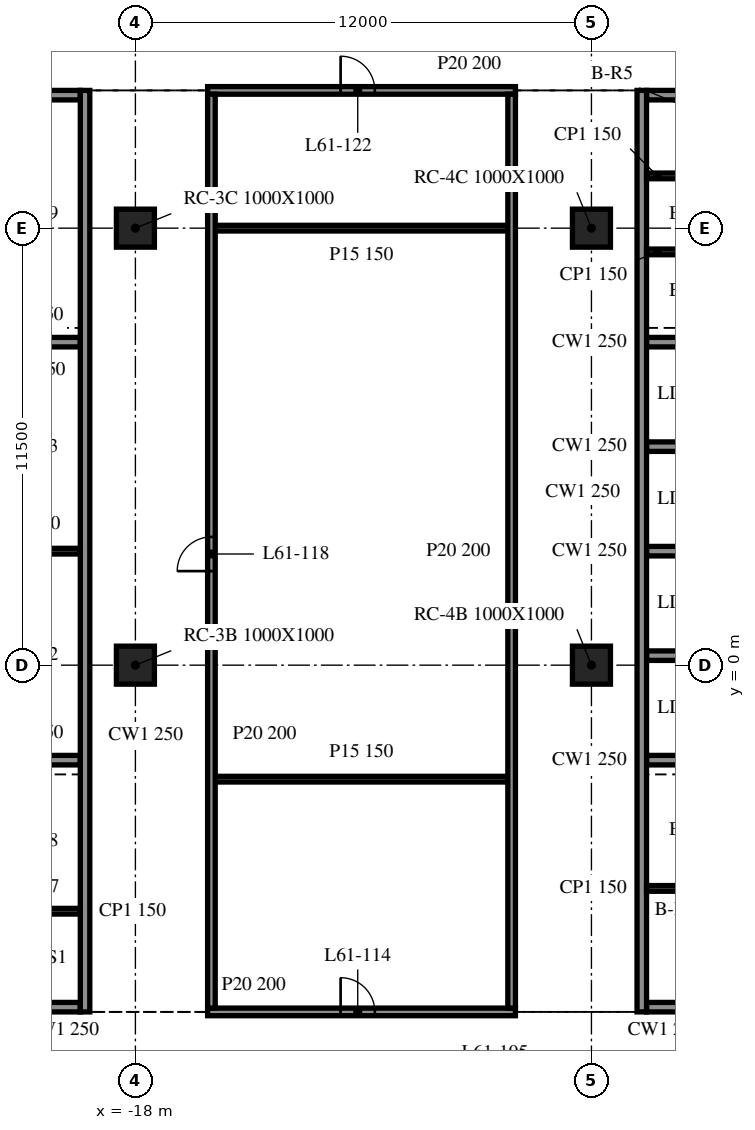
"""IFC4 building model, lengths in metres.
Left out: names, types, materials, properties, quantities, classifications, styles, units other than length and angle.
Written with IfcOpenShell. Run it as: python <this file> out.ifc"""

import sys

from ifc_helpers import new_model, si_unit, direction, frame, frame_2d, origin, origin_2d, place, context, subcontext, project, spatial, rectangle, extrude, element, fill, save


model = new_model("IFC4")
c1 = context("Model", 3, precision=1e-05, world=origin(), true_north=direction((0.0, 1.0)))
c2 = subcontext(c1, "Body", "Model", "MODEL_VIEW")
j1 = project(units=[si_unit("LENGTHUNIT", "METRE"), si_unit("PLANEANGLEUNIT", "RADIAN")], contexts=[c1])
p1 = place(None, origin())
s1 = spatial("IfcSite", under=j1, at=p1, CompositionType="ELEMENT")
p2 = place(p1, origin())
s2 = spatial("IfcBuilding", under=s1, at=p2, CompositionType="ELEMENT")
p3 = place(p2, frame((0.0, 0.0, 251.4)))
s3 = spatial("IfcBuildingStorey", under=s2, at=p3, CompositionType="ELEMENT", Elevation=251.4)
for number, where, z_axis, x_axis in (
    (1, (-18.0, 0.0, -0.34), (0.0, 0.0, 1.0), (1.0, 0.0, 0.0)),
    (2, (-18.0, 11.5, -0.34), (0.0, 0.0, 1.0), (1.0, 0.0, 0.0)),
    (3, (-6.0, 0.0, -0.34), (0.0, 0.0, 1.0), (1.0, 0.0, 0.0)),
    (4, (-6.0, 11.5, -0.34), (0.0, 0.0, 1.0), (1.0, 0.0, 0.0)),
):
    element("IfcColumn", number, at=place(p3, frame(where, z_axis=z_axis, x_axis=x_axis)), inside=s3, PredefinedType="COLUMN", context=c2, shape_type="SweptSolid", body=[
        extrude(rectangle(XDim=1.0, YDim=1.0, at=origin_2d()), origin(), (0.0, 0.0, 1.0), 3.8),
    ])
p4 = place(p3, frame((-19.325, -9.125, 0.0), z_axis=(0.0, 0.0, 1.0), x_axis=(0.0, 1.0, 0.0)))
e5 = element("IfcWall", 5, at=p4, inside=s3, PredefinedType="SOLIDWALL", context=c2, shape_type="SweptSolid", body=[
    extrude(rectangle(XDim=24.25, YDim=0.25, at=frame_2d((12.125, 0.0))), origin(), (0.0, 0.0, 1.0), 3.46),
])
p5 = place(p3, frame((-19.45, -9.0, 0.0), z_axis=(0.0, 0.0, 1.0), x_axis=(-1.0, 0.0, 0.0)))
e6 = element("IfcWall", 6, at=p5, inside=s3, PredefinedType="SOLIDWALL", context=c2, shape_type="SweptSolid", body=[
    extrude(rectangle(XDim=9.1, YDim=0.25, at=frame_2d((4.55, 0.0))), origin(), (0.0, 0.0, 1.0), 3.46),
])
p6 = place(p5, frame((3.65, 0.0, 0.0)))
e7 = element("IfcOpeningElement", 7, at=p6, cuts=e6, PredefinedType="OPENING", context=c2, shape_type="SweptSolid", body=[
    extrude(rectangle(XDim=1.8, YDim=2.1, at=frame_2d((0.9, 1.05))), frame((0.0, 0.135, 0.0), z_axis=(0.0, -1.0, 0.0), x_axis=(1.0, 0.0, 0.0)), (0.0, 0.0, 1.0), 0.27),
])
p7 = place(p3, frame((-28.55, 15.0, 0.0), z_axis=(0.0, 0.0, 1.0), x_axis=(1.0, 0.0, 0.0)))
e8 = element("IfcWall", 8, at=p7, inside=s3, PredefinedType="SOLIDWALL", context=c2, shape_type="SweptSolid", body=[
    extrude(rectangle(XDim=9.1, YDim=0.25, at=frame_2d((4.55, 0.0))), origin(), (0.0, 0.0, 1.0), 3.46),
])
p8 = place(p7, frame((3.65, 0.0, 0.0)))
e9 = element("IfcOpeningElement", 9, at=p8, cuts=e8, PredefinedType="OPENING", context=c2, shape_type="SweptSolid", body=[
    extrude(rectangle(XDim=1.8, YDim=2.1, at=frame_2d((0.9, 1.05))), frame((0.0, 0.135, 0.0), z_axis=(0.0, -1.0, 0.0), x_axis=(1.0, 0.0, 0.0)), (0.0, 0.0, 1.0), 0.27),
])
for number, where, z_axis, x_axis in (
    (10, (-22.3, -2.5, 0.0), (0.0, 0.0, 1.0), (1.0, 0.0, 0.0)),
    (11, (-22.3, 8.5, 0.0), (0.0, 0.0, 1.0), (1.0, 0.0, 0.0)),
):
    element("IfcWall", number, at=place(p3, frame(where, z_axis=z_axis, x_axis=x_axis)), inside=s3, PredefinedType="SOLIDWALL", context=c2, shape_type="SweptSolid", body=[
        extrude(rectangle(XDim=2.85, YDim=0.25, at=frame_2d((1.425, 0.0))), origin(), (0.0, 0.0, 1.0), 3.46),
    ])
for number, where, z_axis, x_axis in (
    (12, (-22.3, 3.0, 0.0), (0.0, 0.0, 1.0), (1.0, 0.0, 0.0)),
    (13, (-22.3, -6.475, 0.0), (0.0, 0.0, 1.0), (1.0, 0.0, 0.0)),
):
    element("IfcWall", number, at=place(p3, frame(where, z_axis=z_axis, x_axis=x_axis)), inside=s3, PredefinedType="PARTITIONING", context=c2, shape_type="SweptSolid", body=[
        extrude(rectangle(XDim=2.85, YDim=0.15, at=frame_2d((1.425, 0.0))), origin(), (0.0, 0.0, 1.0), 3.46),
    ])
p9 = place(p3, frame((-4.675, 15.125, 0.0), z_axis=(0.0, 0.0, 1.0), x_axis=(0.0, -1.0, 0.0)))
e14 = element("IfcWall", 14, at=p9, inside=s3, PredefinedType="SOLIDWALL", context=c2, shape_type="SweptSolid", body=[
    extrude(rectangle(XDim=24.25, YDim=0.25, at=frame_2d((12.125, 0.0))), origin(), (0.0, 0.0, 1.0), 3.46),
])
p10 = place(p3, frame((4.55, -9.0, 0.0), z_axis=(0.0, 0.0, 1.0), x_axis=(-1.0, 0.0, 0.0)))
e15 = element("IfcWall", 15, at=p10, inside=s3, PredefinedType="SOLIDWALL", context=c2, shape_type="SweptSolid", body=[
    extrude(rectangle(XDim=9.1, YDim=0.25, at=frame_2d((4.55, 0.0))), origin(), (0.0, 0.0, 1.0), 3.46),
])
p11 = place(p10, frame((3.65, 0.0, 0.0)))
e16 = element("IfcOpeningElement", 16, at=p11, cuts=e15, PredefinedType="OPENING", context=c2, shape_type="SweptSolid", body=[
    extrude(rectangle(XDim=1.8, YDim=2.1, at=frame_2d((0.9, 1.05))), frame((0.0, 0.135, 0.0), z_axis=(0.0, -1.0, 0.0), x_axis=(1.0, 0.0, 0.0)), (0.0, 0.0, 1.0), 0.27),
])
p12 = place(p3, frame((-4.55, 15.0, 0.0), z_axis=(0.0, 0.0, 1.0), x_axis=(1.0, 0.0, 0.0)))
e17 = element("IfcWall", 17, at=p12, inside=s3, PredefinedType="SOLIDWALL", context=c2, shape_type="SweptSolid", body=[
    extrude(rectangle(XDim=9.1, YDim=0.25, at=frame_2d((4.55, 0.0))), origin(), (0.0, 0.0, 1.0), 3.46),
])
p13 = place(p12, frame((3.65, 0.0, 0.0)))
e18 = element("IfcOpeningElement", 18, at=p13, cuts=e17, PredefinedType="OPENING", context=c2, shape_type="SweptSolid", body=[
    extrude(rectangle(XDim=1.8, YDim=2.1, at=frame_2d((0.9, 1.05))), frame((0.0, 0.135, 0.0), z_axis=(0.0, -1.0, 0.0), x_axis=(1.0, 0.0, 0.0)), (0.0, 0.0, 1.0), 0.27),
])
for number, where, z_axis, x_axis in (
    (19, (-4.55, -2.5, 0.0), (0.0, 0.0, 1.0), (1.0, 0.0, 0.0)),
    (20, (-4.55, 0.25, 0.0), (0.0, 0.0, 1.0), (1.0, 0.0, 0.0)),
    (21, (-4.55, 3.0, 0.0), (0.0, 0.0, 1.0), (1.0, 0.0, 0.0)),
    (22, (-4.55, 5.75, 0.0), (0.0, 0.0, 1.0), (1.0, 0.0, 0.0)),
    (23, (-4.55, 8.5, 0.0), (0.0, 0.0, 1.0), (1.0, 0.0, 0.0)),
):
    element("IfcWall", number, at=place(p3, frame(where, z_axis=z_axis, x_axis=x_axis)), inside=s3, PredefinedType="SOLIDWALL", context=c2, shape_type="SweptSolid", body=[
        extrude(rectangle(XDim=2.85, YDim=0.25, at=frame_2d((1.425, 0.0))), origin(), (0.0, 0.0, 1.0), 3.46),
    ])
for number, where, z_axis, x_axis in (
    (24, (-4.55, -5.875, 0.0), (0.0, 0.0, 1.0), (1.0, 0.0, 0.0)),
    (25, (-4.55, 10.875, 0.0), (0.0, 0.0, 1.0), (1.0, 0.0, 0.0)),
    (26, (-4.55, 12.875, 0.0), (0.0, 0.0, 1.0), (1.0, 0.0, 0.0)),
):
    element("IfcWall", number, at=place(p3, frame(where, z_axis=z_axis, x_axis=x_axis)), inside=s3, PredefinedType="PARTITIONING", context=c2, shape_type="SweptSolid", body=[
        extrude(rectangle(XDim=2.85, YDim=0.15, at=frame_2d((1.425, 0.0))), origin(), (0.0, 0.0, 1.0), 3.46),
    ])
p14 = place(p3, frame((-16.1, -9.125, 0.0), z_axis=(0.0, 0.0, 1.0), x_axis=(1.0, 0.0, 0.0)))
e27 = element("IfcWall", 27, at=p14, inside=s3, PredefinedType="PARTITIONING", context=c2, shape_type="SweptSolid", body=[
    extrude(rectangle(XDim=8.1, YDim=0.2, at=frame_2d((4.05, 0.0))), origin(), (0.0, 0.0, 1.0), 3.46),
])
p15 = place(p14, frame((3.5, 0.0, 0.0)))
e28 = element("IfcOpeningElement", 28, at=p15, cuts=e27, PredefinedType="OPENING", context=c2, shape_type="SweptSolid", body=[
    extrude(rectangle(XDim=0.9, YDim=2.1, at=frame_2d((0.45, 1.05))), frame((0.0, 0.11, 0.0), z_axis=(0.0, -1.0, 0.0), x_axis=(1.0, 0.0, 0.0)), (0.0, 0.0, 1.0), 0.22),
])
for number, where, z_axis, x_axis in (
    (29, (-15.9, -3.0, 0.0), (0.0, 0.0, 1.0), (1.0, 0.0, 0.0)),
    (30, (-15.9, 11.5, 0.0), (0.0, 0.0, 1.0), (1.0, 0.0, 0.0)),
):
    element("IfcWall", number, at=place(p3, frame(where, z_axis=z_axis, x_axis=x_axis)), inside=s3, PredefinedType="PARTITIONING", context=c2, shape_type="SweptSolid", body=[
        extrude(rectangle(XDim=7.7, YDim=0.15, at=frame_2d((3.85, 0.0))), origin(), (0.0, 0.0, 1.0), 3.46),
    ])
p16 = place(p3, frame((-16.1, 15.125, 0.0), z_axis=(0.0, 0.0, 1.0), x_axis=(1.0, 0.0, 0.0)))
e31 = element("IfcWall", 31, at=p16, inside=s3, PredefinedType="PARTITIONING", context=c2, shape_type="SweptSolid", body=[
    extrude(rectangle(XDim=8.1, YDim=0.2, at=frame_2d((4.05, 0.0))), origin(), (0.0, 0.0, 1.0), 3.46),
])
p17 = place(p16, frame((3.5, 0.0, 0.0)))
e32 = element("IfcOpeningElement", 32, at=p17, cuts=e31, PredefinedType="OPENING", context=c2, shape_type="SweptSolid", body=[
    extrude(rectangle(XDim=0.9, YDim=2.1, at=frame_2d((0.45, 1.05))), frame((0.0, 0.11, 0.0), z_axis=(0.0, -1.0, 0.0), x_axis=(1.0, 0.0, 0.0)), (0.0, 0.0, 1.0), 0.22),
])
p18 = place(p3, frame((-16.0, -9.025, 0.0), z_axis=(0.0, 0.0, 1.0), x_axis=(0.0, 1.0, 0.0)))
e33 = element("IfcWall", 33, at=p18, inside=s3, PredefinedType="PARTITIONING", context=c2, shape_type="SweptSolid", body=[
    extrude(rectangle(XDim=24.05, YDim=0.2, at=frame_2d((12.025, 0.0))), origin(), (0.0, 0.0, 1.0), 3.46),
])
p19 = place(p18, frame((11.5, 0.0, 0.0)))
e34 = element("IfcOpeningElement", 34, at=p19, cuts=e33, PredefinedType="OPENING", context=c2, shape_type="SweptSolid", body=[
    extrude(rectangle(XDim=0.9, YDim=2.1, at=frame_2d((0.45, 1.05))), frame((0.0, 0.11, 0.0), z_axis=(0.0, -1.0, 0.0), x_axis=(1.0, 0.0, 0.0)), (0.0, 0.0, 1.0), 0.22),
])
p20 = place(p3, frame((-8.1, -9.025, 0.0), z_axis=(0.0, 0.0, 1.0), x_axis=(0.0, 1.0, 0.0)))
e35 = element("IfcWall", 35, at=p20, inside=s3, PredefinedType="PARTITIONING", context=c2, shape_type="SweptSolid", body=[
    extrude(rectangle(XDim=24.05, YDim=0.2, at=frame_2d((12.025, 0.0))), origin(), (0.0, 0.0, 1.0), 3.46),
])
p21 = place(p15, origin())
e36 = element("IfcDoor", 36, at=p21, inside=s3, OperationType="SINGLE_SWING_LEFT", PredefinedType="DOOR", context=c2, shape_type="SweptSolid", body=[
    extrude(rectangle(XDim=0.9, YDim=2.1, at=frame_2d((0.45, 1.05))), frame((0.0, 0.025, 0.0), z_axis=(0.0, -1.0, 0.0), x_axis=(1.0, 0.0, 0.0)), (0.0, 0.0, 1.0), 0.05),
])
fill(e28, e36)
p22 = place(p19, origin())
e37 = element("IfcDoor", 37, at=p22, inside=s3, OperationType="SINGLE_SWING_RIGHT", PredefinedType="DOOR", context=c2, shape_type="SweptSolid", body=[
    extrude(rectangle(XDim=0.9, YDim=2.1, at=frame_2d((0.45, 1.05))), frame((0.0, 0.025, 0.0), z_axis=(0.0, -1.0, 0.0), x_axis=(1.0, 0.0, 0.0)), (0.0, 0.0, 1.0), 0.05),
])
fill(e34, e37)
p23 = place(p17, origin())
e38 = element("IfcDoor", 38, at=p23, inside=s3, OperationType="SINGLE_SWING_RIGHT", PredefinedType="DOOR", context=c2, shape_type="SweptSolid", body=[
    extrude(rectangle(XDim=0.9, YDim=2.1, at=frame_2d((0.45, 1.05))), frame((0.0, 0.025, 0.0), z_axis=(0.0, -1.0, 0.0), x_axis=(1.0, 0.0, 0.0)), (0.0, 0.0, 1.0), 0.05),
])
fill(e32, e38)
save(model, sys.argv[1])
